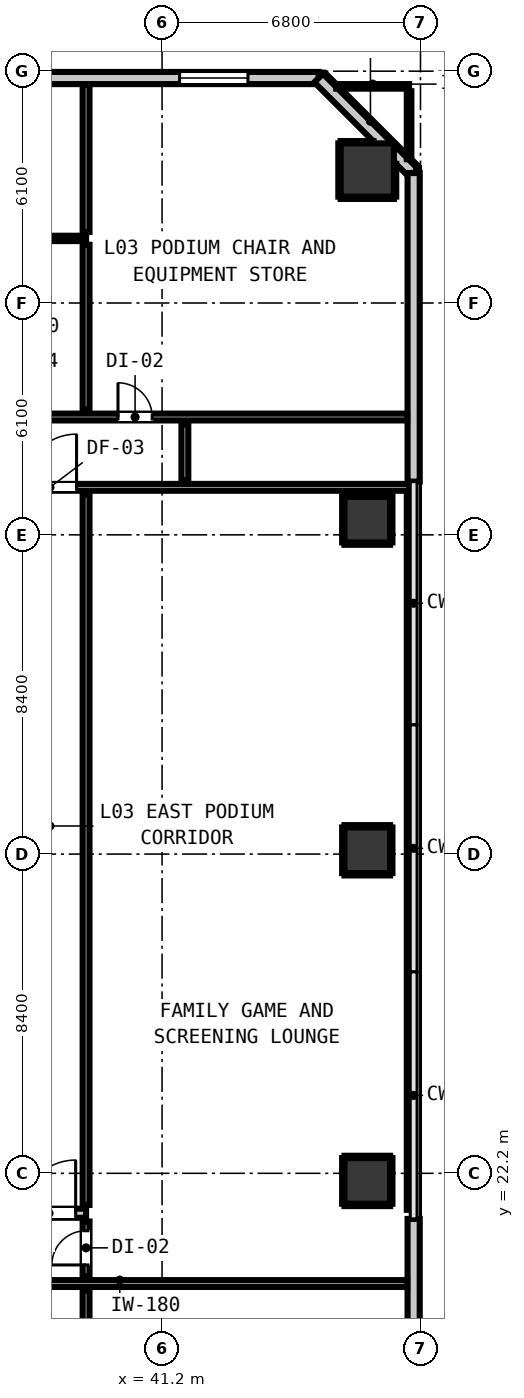
"""IFC4 building model, lengths in metres.
Left out: names, types, materials, properties, quantities, classifications, styles, units other than length and angle.
Written with IfcOpenShell. Run it as: python <this file> out.ifc"""

import sys

from ifc_helpers import new_model, si_unit, direction, frame, frame_2d, origin, origin_2d, place, context, subcontext, project, spatial, rectangle, circle, extrude, element, fill, save


model = new_model("IFC4")
c1 = context("Model", 3, precision=1e-05, world=origin(), true_north=direction((0.0, 1.0)))
c2 = subcontext(c1, "Body", "Model", "MODEL_VIEW")
j1 = project(units=[si_unit("LENGTHUNIT", "METRE"), si_unit("PLANEANGLEUNIT", "RADIAN")], contexts=[c1])
p1 = place(None, origin())
s1 = spatial("IfcSite", under=j1, at=p1, CompositionType="ELEMENT")
p2 = place(p1, origin())
s2 = spatial("IfcBuilding", under=s1, at=p2, CompositionType="ELEMENT")
p3 = place(p2, frame((0.0, 0.0, 13.6)))
s3 = spatial("IfcBuildingStorey", under=s2, at=p3, CompositionType="ELEMENT", Elevation=13.6)
for number, where, z_axis, x_axis in (
    (1, (46.6, 22.0, 0.0), (0.0, 0.0, 1.0), (1.0, 0.0, 0.0)),
    (2, (46.6, 30.7, 0.0), (0.0, 0.0, 1.0), (1.0, 0.0, 0.0)),
    (3, (46.6, 39.4, 0.0), (0.0, 0.0, 1.0), (1.0, 0.0, 0.0)),
):
    element("IfcColumn", number, at=place(p3, frame(where, z_axis=z_axis, x_axis=x_axis)), inside=s3, PredefinedType="COLUMN", context=c2, shape_type="SweptSolid", body=[
        extrude(circle(Radius=0.6, at=origin_2d()), origin(), (0.0, 0.0, 1.0), 4.2),
    ])
p4 = place(p3, frame((46.6, 48.6, 0.0), z_axis=(0.0, 0.0, 1.0), x_axis=(1.0, 0.0, 0.0)))
e4 = element("IfcColumn", 4, at=p4, inside=s3, PredefinedType="COLUMN", context=c2, shape_type="SweptSolid", body=[
    extrude(rectangle(XDim=1.4, YDim=1.4, at=origin_2d()), origin(), (0.0, 0.0, 1.0), 4.2),
])
p5 = place(p3, frame((6.68, 51.02, 0.0), z_axis=(0.0, 0.0, 1.0), x_axis=(1.0, 0.0, 0.0)))
e5 = element("IfcWall", 5, at=p5, inside=s3, PredefinedType="STANDARD", context=c2, shape_type="SweptSolid", body=[
    extrude(rectangle(XDim=38.64, YDim=0.32, at=frame_2d((19.32, 0.0))), origin(), (0.0, 0.0, 1.0), 3.78),
])
p6 = place(p5, frame((18.42, 0.0, 0.9)))
e6 = element("IfcOpeningElement", 6, at=p6, cuts=e5, PredefinedType="OPENING", context=c2, shape_type="SweptSolid", body=[
    extrude(rectangle(XDim=1.8, YDim=1.9, at=frame_2d((0.9, 0.95))), frame((0.0, 0.17, 0.0), z_axis=(0.0, -1.0, 0.0), x_axis=(1.0, 0.0, 0.0)), (0.0, 0.0, 1.0), 0.34),
])
p7 = place(p5, frame((23.94, 0.0, 0.9)))
e7 = element("IfcOpeningElement", 7, at=p7, cuts=e5, PredefinedType="OPENING", context=c2, shape_type="SweptSolid", body=[
    extrude(rectangle(XDim=1.8, YDim=1.9, at=frame_2d((0.9, 0.95))), frame((0.0, 0.17, 0.0), z_axis=(0.0, -1.0, 0.0), x_axis=(1.0, 0.0, 0.0)), (0.0, 0.0, 1.0), 0.34),
])
p8 = place(p5, frame((34.98, 0.0, 0.9)))
e8 = element("IfcOpeningElement", 8, at=p8, cuts=e5, PredefinedType="OPENING", context=c2, shape_type="SweptSolid", body=[
    extrude(rectangle(XDim=1.8, YDim=1.9, at=frame_2d((0.9, 0.95))), frame((0.0, 0.17, 0.0), z_axis=(0.0, -1.0, 0.0), x_axis=(1.0, 0.0, 0.0)), (0.0, 0.0, 1.0), 0.34),
])
p9 = place(p3, frame((45.32, 51.02, 0.0), z_axis=(0.0, 0.0, 1.0), x_axis=(0.707106781187, -0.707106781187, 0.0)))
e9 = element("IfcWall", 9, at=p9, inside=s3, PredefinedType="STANDARD", context=c2, shape_type="SweptSolid", body=[
    extrude(rectangle(XDim=3.536, YDim=0.32, at=frame_2d((1.768, 0.0))), origin(), (0.0, 0.0, 1.0), 3.78),
])
p10 = place(p3, frame((47.82, 48.52, 0.0), z_axis=(0.0, 0.0, 1.0), x_axis=(0.0, -1.0, 0.0)))
e10 = element("IfcWall", 10, at=p10, inside=s3, PredefinedType="STANDARD", context=c2, shape_type="SweptSolid", body=[
    extrude(rectangle(XDim=8.12, YDim=0.32, at=frame_2d((4.06, 0.0))), origin(), (0.0, 0.0, 1.0), 3.78),
])
p11 = place(p3, frame((47.82, 21.0, 0.0), z_axis=(0.0, 0.0, 1.0), x_axis=(0.0, -1.0, 0.0)))
e11 = element("IfcWall", 11, at=p11, inside=s3, PredefinedType="STANDARD", context=c2, shape_type="SweptSolid", body=[
    extrude(rectangle(XDim=8.32, YDim=0.32, at=frame_2d((4.16, 0.0))), origin(), (0.0, 0.0, 1.0), 3.78),
])
p12 = place(p3, frame((10.5, 21.15, 0.0), z_axis=(0.0, 0.0, 1.0), x_axis=(1.0, 0.0, 0.0)))
e12 = element("IfcWall", 12, at=p12, inside=s3, PredefinedType="PARTITIONING", context=c2, shape_type="SweptSolid", body=[
    extrude(rectangle(XDim=28.7, YDim=0.24, at=frame_2d((14.35, 0.0))), origin(), (0.0, 0.0, 1.0), 3.78),
])
p13 = place(p12, frame((7.71, 0.0, 0.0)))
e13 = element("IfcOpeningElement", 13, at=p13, cuts=e12, PredefinedType="OPENING", context=c2, shape_type="SweptSolid", body=[
    extrude(rectangle(XDim=1.1, YDim=2.15, at=frame_2d((0.55, 1.075))), frame((0.0, 0.13, 0.0), z_axis=(0.0, -1.0, 0.0), x_axis=(1.0, 0.0, 0.0)), (0.0, 0.0, 1.0), 0.26),
])
p14 = place(p12, frame((0.324, 0.0, 0.0)))
e14 = element("IfcOpeningElement", 14, at=p14, cuts=e12, PredefinedType="OPENING", context=c2, shape_type="SweptSolid", body=[
    extrude(rectangle(XDim=1.4, YDim=2.15, at=frame_2d((0.7, 1.075))), frame((0.0, 0.13, 0.0), z_axis=(0.0, -1.0, 0.0), x_axis=(1.0, 0.0, 0.0)), (0.0, 0.0, 1.0), 0.26),
])
p15 = place(p12, frame((27.026, 0.0, 0.0)))
e15 = element("IfcOpeningElement", 15, at=p15, cuts=e12, PredefinedType="OPENING", context=c2, shape_type="SweptSolid", body=[
    extrude(rectangle(XDim=1.4, YDim=2.15, at=frame_2d((0.7, 1.075))), frame((0.0, 0.13, 0.0), z_axis=(0.0, -1.0, 0.0), x_axis=(1.0, 0.0, 0.0)), (0.0, 0.0, 1.0), 0.26),
])
p16 = place(p3, frame((4.352, 19.3, 0.0), z_axis=(0.0, 0.0, 1.0), x_axis=(1.0, 0.0, 0.0)))
e16 = element("IfcWall", 16, at=p16, inside=s3, PredefinedType="PARTITIONING", context=c2, shape_type="SweptSolid", body=[
    extrude(rectangle(XDim=43.296, YDim=0.18, at=frame_2d((21.648, 0.0))), origin(), (0.0, 0.0, 1.0), 3.78),
])
p17 = place(p16, frame((12.872, 0.0, 0.0)))
e17 = element("IfcOpeningElement", 17, at=p17, cuts=e16, PredefinedType="OPENING", context=c2, shape_type="SweptSolid", body=[
    extrude(rectangle(XDim=0.9, YDim=2.1, at=frame_2d((0.45, 1.05))), frame((0.0, 0.1, 0.0), z_axis=(0.0, -1.0, 0.0), x_axis=(1.0, 0.0, 0.0)), (0.0, 0.0, 1.0), 0.2),
])
p18 = place(p16, frame((27.174, 0.0, 0.0)))
e18 = element("IfcOpeningElement", 18, at=p18, cuts=e16, PredefinedType="OPENING", context=c2, shape_type="SweptSolid", body=[
    extrude(rectangle(XDim=0.9, YDim=2.1, at=frame_2d((0.45, 1.05))), frame((0.0, 0.1, 0.0), z_axis=(0.0, -1.0, 0.0), x_axis=(1.0, 0.0, 0.0)), (0.0, 0.0, 1.0), 0.2),
])
p19 = place(p3, frame((10.5, 40.25, 0.0), z_axis=(0.0, 0.0, 1.0), x_axis=(1.0, 0.0, 0.0)))
e19 = element("IfcWall", 19, at=p19, inside=s3, PredefinedType="PARTITIONING", context=c2, shape_type="SweptSolid", body=[
    extrude(rectangle(XDim=37.2, YDim=0.18, at=frame_2d((18.6, 0.0))), origin(), (0.0, 0.0, 1.0), 3.78),
])
p20 = place(p19, frame((6.935, 0.0, 0.0)))
e20 = element("IfcOpeningElement", 20, at=p20, cuts=e19, PredefinedType="OPENING", context=c2, shape_type="SweptSolid", body=[
    extrude(rectangle(XDim=1.4, YDim=2.15, at=frame_2d((0.7, 1.075))), frame((0.0, 0.1, 0.0), z_axis=(0.0, -1.0, 0.0), x_axis=(1.0, 0.0, 0.0)), (0.0, 0.0, 1.0), 0.2),
])
p21 = place(p19, frame((0.324, 0.0, 0.0)))
e21 = element("IfcOpeningElement", 21, at=p21, cuts=e19, PredefinedType="OPENING", context=c2, shape_type="SweptSolid", body=[
    extrude(rectangle(XDim=1.4, YDim=2.15, at=frame_2d((0.7, 1.075))), frame((0.0, 0.1, 0.0), z_axis=(0.0, -1.0, 0.0), x_axis=(1.0, 0.0, 0.0)), (0.0, 0.0, 1.0), 0.2),
])
p22 = place(p19, frame((27.05, 0.0, 0.0)))
e22 = element("IfcOpeningElement", 22, at=p22, cuts=e19, PredefinedType="OPENING", context=c2, shape_type="SweptSolid", body=[
    extrude(rectangle(XDim=1.4, YDim=2.15, at=frame_2d((0.7, 1.075))), frame((0.0, 0.1, 0.0), z_axis=(0.0, -1.0, 0.0), x_axis=(1.0, 0.0, 0.0)), (0.0, 0.0, 1.0), 0.2),
])
p23 = place(p3, frame((4.352, 42.1, 0.0), z_axis=(0.0, 0.0, 1.0), x_axis=(1.0, 0.0, 0.0)))
e23 = element("IfcWall", 23, at=p23, inside=s3, PredefinedType="PARTITIONING", context=c2, shape_type="SweptSolid", body=[
    extrude(rectangle(XDim=43.296, YDim=0.18, at=frame_2d((21.648, 0.0))), origin(), (0.0, 0.0, 1.0), 3.78),
])
p24 = place(p23, frame((14.472, 0.0, 0.0)))
e24 = element("IfcOpeningElement", 24, at=p24, cuts=e23, PredefinedType="OPENING", context=c2, shape_type="SweptSolid", body=[
    extrude(rectangle(XDim=0.9, YDim=2.1, at=frame_2d((0.45, 1.05))), frame((0.0, 0.1, 0.0), z_axis=(0.0, -1.0, 0.0), x_axis=(1.0, 0.0, 0.0)), (0.0, 0.0, 1.0), 0.2),
])
p25 = place(p23, frame((25.118, 0.0, 0.0)))
e25 = element("IfcOpeningElement", 25, at=p25, cuts=e23, PredefinedType="OPENING", context=c2, shape_type="SweptSolid", body=[
    extrude(rectangle(XDim=0.86, YDim=2.02, at=frame_2d((0.43, 1.01))), frame((0.0, 0.1, 0.0), z_axis=(0.0, -1.0, 0.0), x_axis=(1.0, 0.0, 0.0)), (0.0, 0.0, 1.0), 0.2),
])
p26 = place(p23, frame((29.218, 0.0, 0.0)))
e26 = element("IfcOpeningElement", 26, at=p26, cuts=e23, PredefinedType="OPENING", context=c2, shape_type="SweptSolid", body=[
    extrude(rectangle(XDim=0.86, YDim=2.02, at=frame_2d((0.43, 1.01))), frame((0.0, 0.1, 0.0), z_axis=(0.0, -1.0, 0.0), x_axis=(1.0, 0.0, 0.0)), (0.0, 0.0, 1.0), 0.2),
])
p27 = place(p23, frame((32.873, 0.0, 0.0)))
e27 = element("IfcOpeningElement", 27, at=p27, cuts=e23, PredefinedType="OPENING", context=c2, shape_type="SweptSolid", body=[
    extrude(rectangle(XDim=0.95, YDim=2.1, at=frame_2d((0.475, 1.05))), frame((0.0, 0.1, 0.0), z_axis=(0.0, -1.0, 0.0), x_axis=(1.0, 0.0, 0.0)), (0.0, 0.0, 1.0), 0.2),
])
p28 = place(p23, frame((35.688, 0.0, 0.0)))
e28 = element("IfcOpeningElement", 28, at=p28, cuts=e23, PredefinedType="OPENING", context=c2, shape_type="SweptSolid", body=[
    extrude(rectangle(XDim=0.9, YDim=2.1, at=frame_2d((0.45, 1.05))), frame((0.0, 0.1, 0.0), z_axis=(0.0, -1.0, 0.0), x_axis=(1.0, 0.0, 0.0)), (0.0, 0.0, 1.0), 0.2),
])
p29 = place(p3, frame((28.0, 46.8, 0.0), z_axis=(0.0, 0.0, 1.0), x_axis=(1.0, 0.0, 0.0)))
e29 = element("IfcWall", 29, at=p29, inside=s3, PredefinedType="PARTITIONING", context=c2, shape_type="SweptSolid", body=[
    extrude(rectangle(XDim=11.2, YDim=0.14, at=frame_2d((5.6, 0.0))), origin(), (0.0, 0.0, 1.0), 3.78),
])
p30 = place(p3, frame((45.783, 50.8, 0.0), z_axis=(0.0, 0.0, 1.0), x_axis=(1.0, 0.0, 0.0)))
e30 = element("IfcWall", 30, at=p30, inside=s3, PredefinedType="PARTITIONING", context=c2, shape_type="SweptSolid", body=[
    extrude(rectangle(XDim=1.917, YDim=0.12, at=frame_2d((0.958, 0.0))), origin(), (0.0, 0.0, 1.0), 3.78),
])
p31 = place(p3, frame((39.2, 12.358, 0.0), z_axis=(0.0, 0.0, 1.0), x_axis=(0.0, 1.0, 0.0)))
e31 = element("IfcWall", 31, at=p31, inside=s3, PredefinedType="PARTITIONING", context=c2, shape_type="SweptSolid", body=[
    extrude(rectangle(XDim=6.754, YDim=0.18, at=frame_2d((3.377, 0.0))), origin(), (0.0, 0.0, 1.0), 3.78),
])
p32 = place(p3, frame((39.2, 19.488, 0.0), z_axis=(0.0, 0.0, 1.0), x_axis=(0.0, 1.0, 0.0)))
e32 = element("IfcWall", 32, at=p32, inside=s3, PredefinedType="PARTITIONING", context=c2, shape_type="SweptSolid", body=[
    extrude(rectangle(XDim=1.444, YDim=0.18, at=frame_2d((0.722, 0.0))), origin(), (0.0, 0.0, 1.0), 3.78),
])
p33 = place(p32, frame((0.301, 0.0, 0.0)))
e33 = element("IfcOpeningElement", 33, at=p33, cuts=e32, PredefinedType="OPENING", context=c2, shape_type="SweptSolid", body=[
    extrude(rectangle(XDim=0.9, YDim=2.1, at=frame_2d((0.45, 1.05))), frame((0.0, 0.1, 0.0), z_axis=(0.0, -1.0, 0.0), x_axis=(1.0, 0.0, 0.0)), (0.0, 0.0, 1.0), 0.2),
])
p34 = place(p3, frame((39.2, 21.368, 0.0), z_axis=(0.0, 0.0, 1.0), x_axis=(0.0, 1.0, 0.0)))
e34 = element("IfcWall", 34, at=p34, inside=s3, PredefinedType="PARTITIONING", context=c2, shape_type="SweptSolid", body=[
    extrude(rectangle(XDim=18.694, YDim=0.18, at=frame_2d((9.347, 0.0))), origin(), (0.0, 0.0, 1.0), 3.78),
])
p35 = place(p3, frame((39.2, 42.288, 0.0), z_axis=(0.0, 0.0, 1.0), x_axis=(0.0, 1.0, 0.0)))
e35 = element("IfcWall", 35, at=p35, inside=s3, PredefinedType="PARTITIONING", context=c2, shape_type="SweptSolid", body=[
    extrude(rectangle(XDim=4.344, YDim=0.18, at=frame_2d((2.172, 0.0))), origin(), (0.0, 0.0, 1.0), 3.78),
])
p36 = place(p3, frame((39.2, 46.968, 0.0), z_axis=(0.0, 0.0, 1.0), x_axis=(0.0, 1.0, 0.0)))
e36 = element("IfcWall", 36, at=p36, inside=s3, PredefinedType="PARTITIONING", context=c2, shape_type="SweptSolid", body=[
    extrude(rectangle(XDim=3.88, YDim=0.18, at=frame_2d((1.94, 0.0))), origin(), (0.0, 0.0, 1.0), 3.78),
])
p37 = place(p3, frame((41.8, 40.438, 0.0), z_axis=(0.0, 0.0, 1.0), x_axis=(0.0, 1.0, 0.0)))
e37 = element("IfcWall", 37, at=p37, inside=s3, PredefinedType="PARTITIONING", context=c2, shape_type="SweptSolid", body=[
    extrude(rectangle(XDim=1.474, YDim=0.18, at=frame_2d((0.737, 0.0))), origin(), (0.0, 0.0, 1.0), 3.78),
])
p38 = place(p3, frame((47.7, 21.24, 0.0), z_axis=(0.0, 0.0, 1.0), x_axis=(0.0, 1.0, 0.0)))
e38 = element("IfcWall", 38, at=p38, inside=s3, PredefinedType="PARTITIONING", context=c2, shape_type="SweptSolid", body=[
    extrude(rectangle(XDim=18.852, YDim=0.12, at=frame_2d((9.426, 0.0))), origin(), (0.0, 0.0, 1.0), 3.78),
])
p39 = place(p3, frame((47.7, 48.883, 0.0), z_axis=(0.0, 0.0, 1.0), x_axis=(0.0, 1.0, 0.0)))
e39 = element("IfcWall", 39, at=p39, inside=s3, PredefinedType="PARTITIONING", context=c2, shape_type="SweptSolid", body=[
    extrude(rectangle(XDim=1.789, YDim=0.12, at=frame_2d((0.895, 0.0))), origin(), (0.0, 0.0, 1.0), 3.78),
])
for number, where, z_axis, x_axis in (
    (40, (46.0, 21.368, 0.0), (0.0, 0.0, 1.0), (1.0, 0.0, 0.0)),
    (41, (46.0, 22.632, 0.0), (0.0, 0.0, 1.0), (1.0, 0.0, 0.0)),
):
    element("IfcWall", number, at=place(p3, frame(where, z_axis=z_axis, x_axis=x_axis)), inside=s3, PredefinedType="PARTITIONING", context=c2, shape_type="SweptSolid", body=[
        extrude(rectangle(XDim=1.2, YDim=0.06, at=frame_2d((0.6, 0.0))), origin(), (0.0, 0.0, 1.0), 1.45),
    ])
for number, where, z_axis, x_axis in (
    (42, (45.968, 21.4, 0.0), (0.0, 0.0, 1.0), (0.0, 1.0, 0.0)),
    (43, (47.232, 21.4, 0.0), (0.0, 0.0, 1.0), (0.0, 1.0, 0.0)),
):
    element("IfcWall", number, at=place(p3, frame(where, z_axis=z_axis, x_axis=x_axis)), inside=s3, PredefinedType="PARTITIONING", context=c2, shape_type="SweptSolid", body=[
        extrude(rectangle(XDim=1.2, YDim=0.06, at=frame_2d((0.6, 0.0))), origin(), (0.0, 0.0, 1.0), 1.45),
    ])
for number, where, z_axis, x_axis in (
    (44, (46.0, 30.068, 0.0), (0.0, 0.0, 1.0), (1.0, 0.0, 0.0)),
    (45, (46.0, 31.332, 0.0), (0.0, 0.0, 1.0), (1.0, 0.0, 0.0)),
    (46, (45.968, 30.1, 0.0), (0.0, 0.0, 1.0), (0.0, 1.0, 0.0)),
    (47, (47.232, 30.1, 0.0), (0.0, 0.0, 1.0), (0.0, 1.0, 0.0)),
    (48, (46.0, 38.768, 0.0), (0.0, 0.0, 1.0), (1.0, 0.0, 0.0)),
    (49, (46.0, 40.032, 0.0), (0.0, 0.0, 1.0), (1.0, 0.0, 0.0)),
    (50, (45.968, 38.8, 0.0), (0.0, 0.0, 1.0), (0.0, 1.0, 0.0)),
    (51, (47.232, 38.8, 0.0), (0.0, 0.0, 1.0), (0.0, 1.0, 0.0)),
):
    element("IfcWall", number, at=place(p3, frame(where, z_axis=z_axis, x_axis=x_axis)), inside=s3, PredefinedType="PARTITIONING", context=c2, shape_type="SweptSolid", body=[
        extrude(rectangle(XDim=1.2, YDim=0.06, at=frame_2d((0.6, 0.0))), origin(), (0.0, 0.0, 1.0), 1.45),
    ])
p40 = place(p3, frame((45.9, 47.868, 0.0), z_axis=(0.0, 0.0, 1.0), x_axis=(1.0, 0.0, 0.0)))
e52 = element("IfcWall", 52, at=p40, inside=s3, PredefinedType="PARTITIONING", context=c2, shape_type="SweptSolid", body=[
    extrude(rectangle(XDim=1.4, YDim=0.06, at=frame_2d((0.7, 0.0))), origin(), (0.0, 0.0, 1.0), 1.45),
])
p41 = place(p3, frame((45.9, 49.332, 0.0), z_axis=(0.0, 0.0, 1.0), x_axis=(1.0, 0.0, 0.0)))
e53 = element("IfcWall", 53, at=p41, inside=s3, PredefinedType="PARTITIONING", context=c2, shape_type="SweptSolid", body=[
    extrude(rectangle(XDim=0.861, YDim=0.06, at=frame_2d((0.431, 0.0))), origin(), (0.0, 0.0, 1.0), 1.45),
])
p42 = place(p3, frame((45.868, 47.9, 0.0), z_axis=(0.0, 0.0, 1.0), x_axis=(0.0, 1.0, 0.0)))
e54 = element("IfcWall", 54, at=p42, inside=s3, PredefinedType="PARTITIONING", context=c2, shape_type="SweptSolid", body=[
    extrude(rectangle(XDim=1.4, YDim=0.06, at=frame_2d((0.7, 0.0))), origin(), (0.0, 0.0, 1.0), 1.45),
])
p43 = place(p3, frame((47.332, 47.9, 0.0), z_axis=(0.0, 0.0, 1.0), x_axis=(0.0, 1.0, 0.0)))
e55 = element("IfcWall", 55, at=p43, inside=s3, PredefinedType="PARTITIONING", context=c2, shape_type="SweptSolid", body=[
    extrude(rectangle(XDim=0.861, YDim=0.06, at=frame_2d((0.431, 0.0))), origin(), (0.0, 0.0, 1.0), 1.45),
])
p44 = place(p8, origin())
e56 = element("IfcWindow", 56, at=p44, inside=s3, PartitioningType="SINGLE_PANEL", PredefinedType="WINDOW", context=c2, shape_type="SweptSolid", body=[
    extrude(rectangle(XDim=1.8, YDim=1.9, at=frame_2d((0.9, 0.95))), frame((0.0, 0.03, 0.0), z_axis=(0.0, -1.0, 0.0), x_axis=(1.0, 0.0, 0.0)), (0.0, 0.0, 1.0), 0.06),
])
fill(e8, e56)
p45 = place(p15, origin())
e57 = element("IfcDoor", 57, at=p45, inside=s3, OperationType="SINGLE_SWING_RIGHT", PredefinedType="DOOR", context=c2, shape_type="SweptSolid", body=[
    extrude(rectangle(XDim=1.4, YDim=2.15, at=frame_2d((0.7, 1.075))), frame((0.0, 0.025, 0.0), z_axis=(0.0, -1.0, 0.0), x_axis=(1.0, 0.0, 0.0)), (0.0, 0.0, 1.0), 0.05),
])
fill(e15, e57)
p46 = place(p22, origin())
e58 = element("IfcDoor", 58, at=p46, inside=s3, OperationType="SINGLE_SWING_RIGHT", PredefinedType="DOOR", context=c2, shape_type="SweptSolid", body=[
    extrude(rectangle(XDim=1.4, YDim=2.15, at=frame_2d((0.7, 1.075))), frame((0.0, 0.025, 0.0), z_axis=(0.0, -1.0, 0.0), x_axis=(1.0, 0.0, 0.0)), (0.0, 0.0, 1.0), 0.05),
])
fill(e22, e58)
p47 = place(p33, origin())
e59 = element("IfcDoor", 59, at=p47, inside=s3, OperationType="SINGLE_SWING_LEFT", PredefinedType="DOOR", context=c2, shape_type="SweptSolid", body=[
    extrude(rectangle(XDim=0.9, YDim=2.1, at=frame_2d((0.45, 1.05))), frame((0.0, 0.025, 0.0), z_axis=(0.0, -1.0, 0.0), x_axis=(1.0, 0.0, 0.0)), (0.0, 0.0, 1.0), 0.05),
])
fill(e33, e59)
p48 = place(p28, origin())
e60 = element("IfcDoor", 60, at=p48, inside=s3, OperationType="SINGLE_SWING_LEFT", PredefinedType="DOOR", context=c2, shape_type="SweptSolid", body=[
    extrude(rectangle(XDim=0.9, YDim=2.1, at=frame_2d((0.45, 1.05))), frame((0.0, 0.025, 0.0), z_axis=(0.0, -1.0, 0.0), x_axis=(1.0, 0.0, 0.0)), (0.0, 0.0, 1.0), 0.05),
])
fill(e28, e60)
save(model, sys.argv[1])
